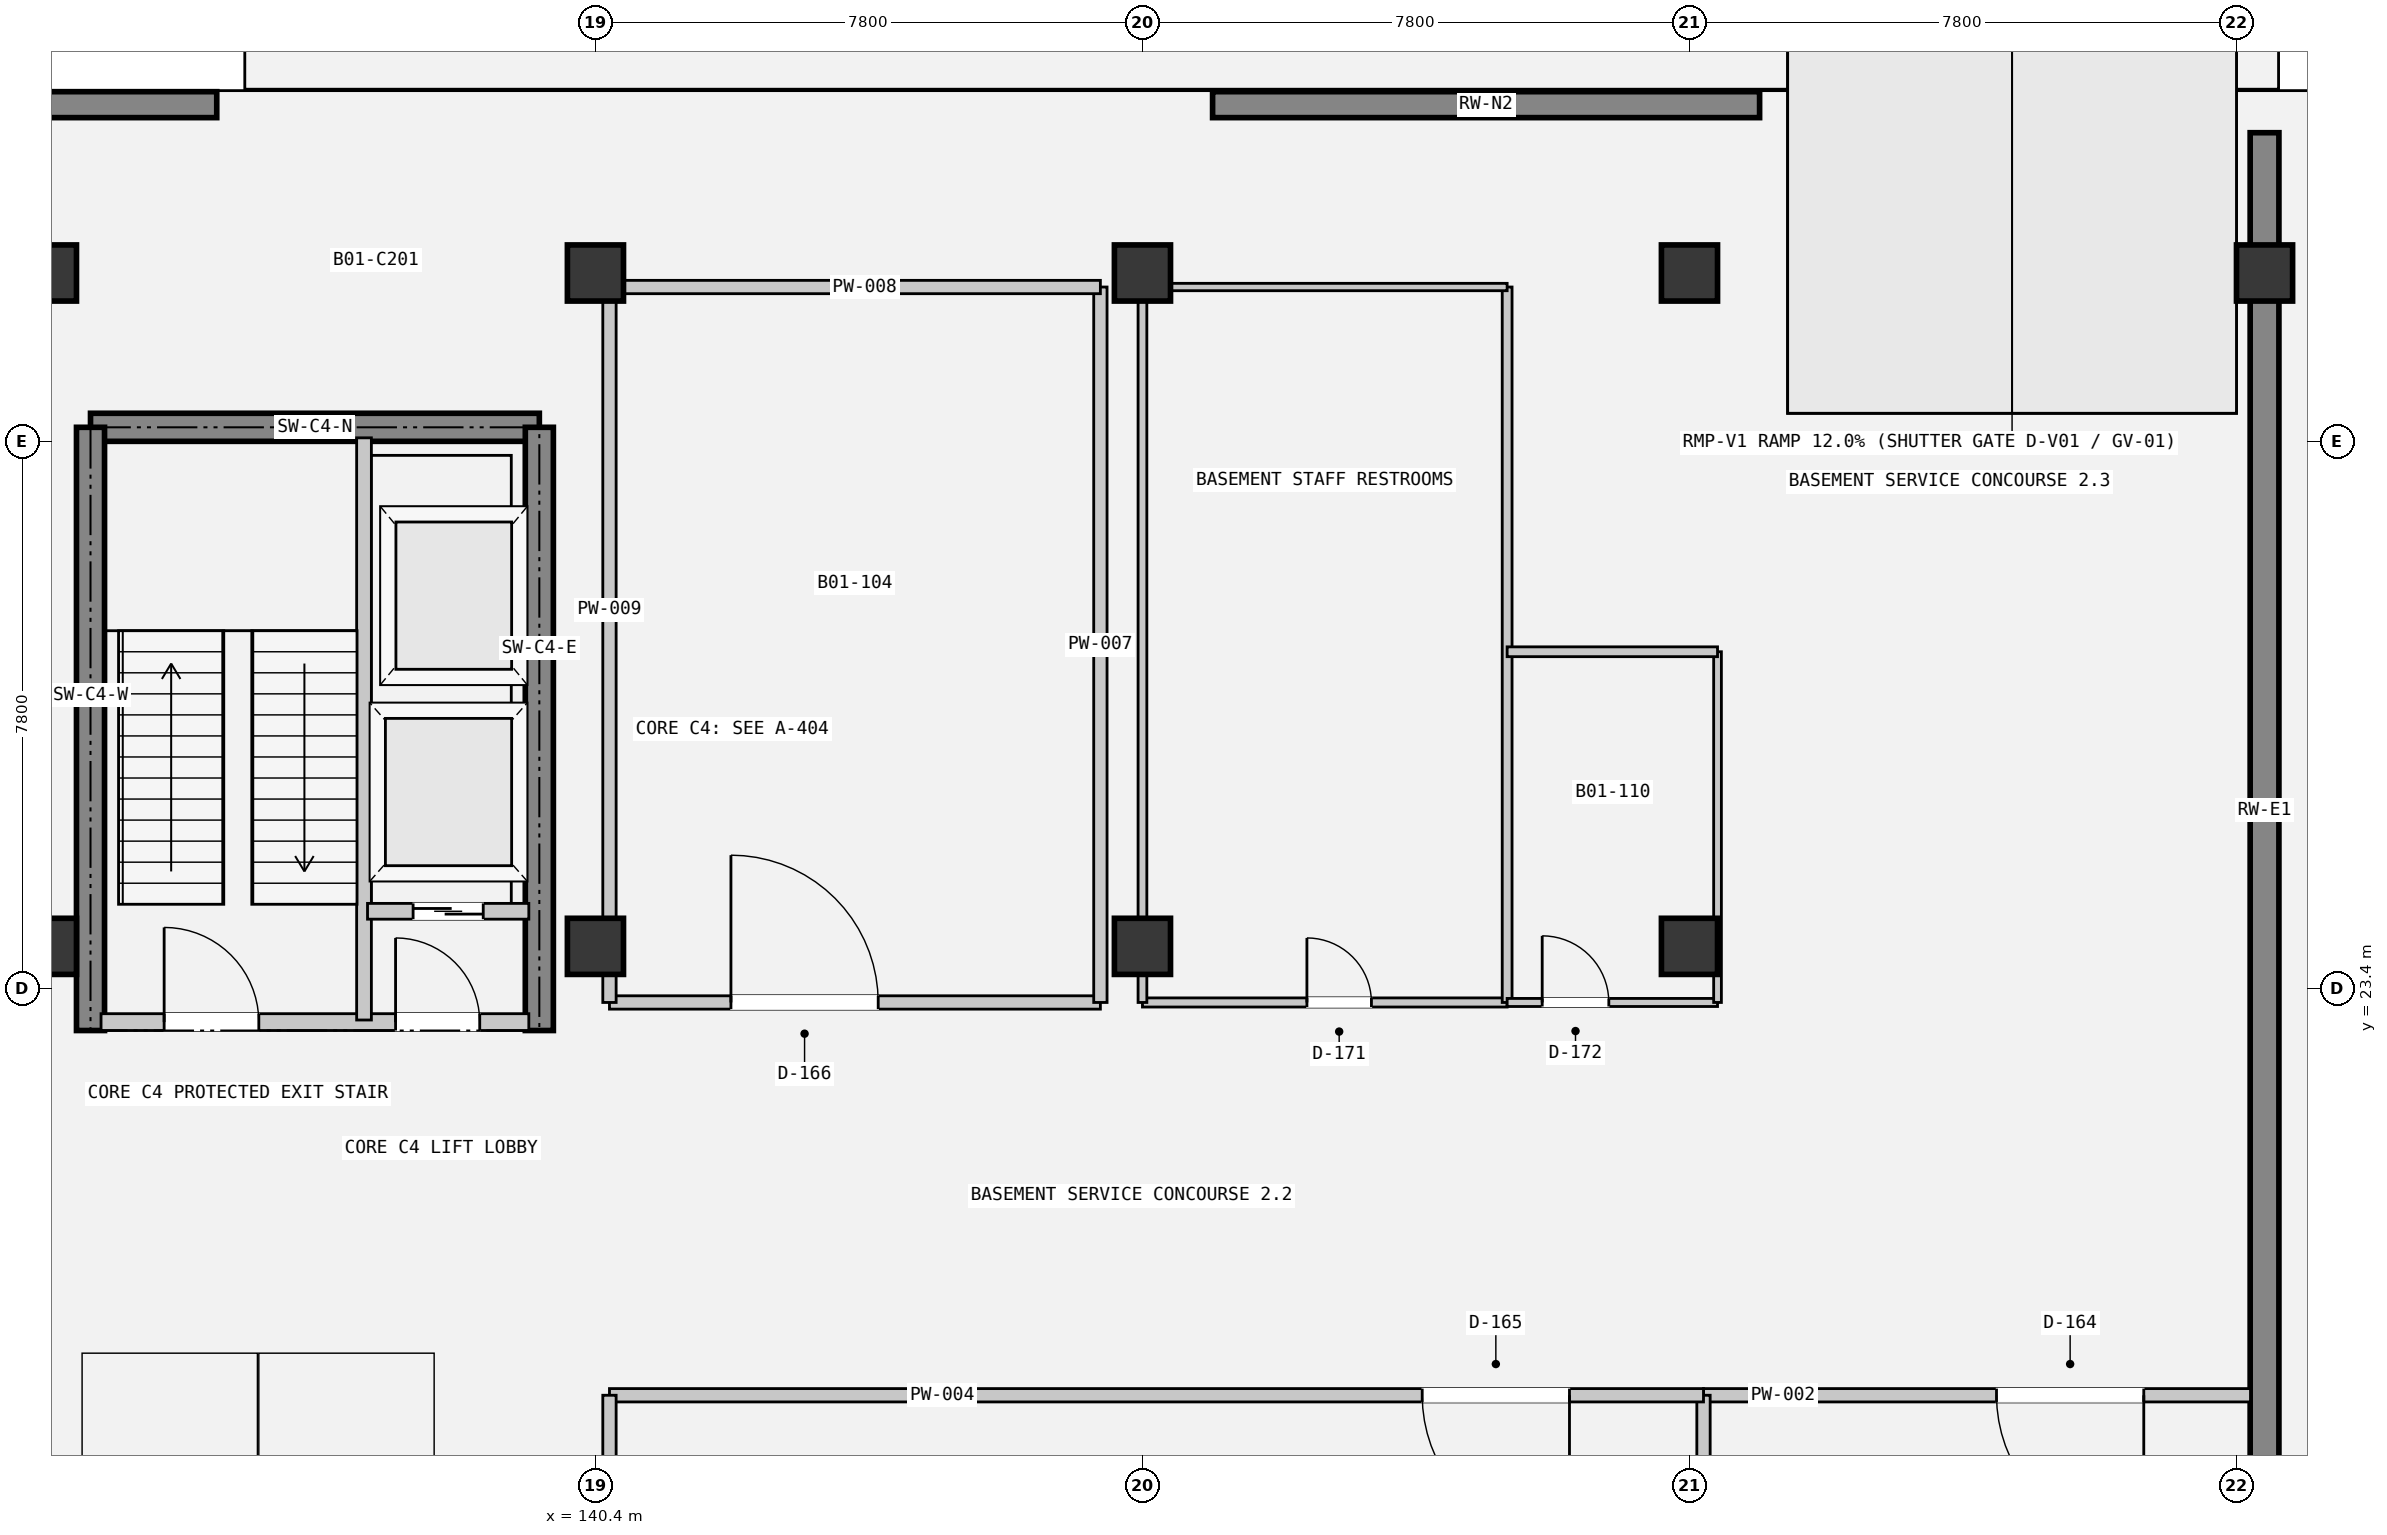
"""IFC4 building model, lengths in metres.
Left out: names, types, materials, properties, quantities, classifications, styles, units other than length and angle.
Written with IfcOpenShell. Run it as: python <this file> out.ifc"""

import sys

from ifc_helpers import new_model, si_unit, direction, frame, frame_2d, origin, origin_2d, place, context, subcontext, project, spatial, rectangle, extrude, element, fill, save


model = new_model("IFC4")
c1 = context("Model", 3, precision=1e-05, world=origin(), true_north=direction((0.0, 1.0)))
c2 = subcontext(c1, "Body", "Model", "MODEL_VIEW")
j1 = project(units=[si_unit("LENGTHUNIT", "METRE"), si_unit("PLANEANGLEUNIT", "RADIAN")], contexts=[c1])
p1 = place(None, origin())
s1 = spatial("IfcSite", under=j1, at=p1, CompositionType="ELEMENT")
p2 = place(p1, origin())
s2 = spatial("IfcBuilding", under=s1, at=p2, CompositionType="ELEMENT")
p3 = place(p2, frame((0.0, 0.0, -4.8)))
s3 = spatial("IfcBuildingStorey", under=s2, at=p3, CompositionType="ELEMENT", Elevation=-4.8)
for number, where, z_axis, x_axis in (
    (1, (132.6, 24.0, 0.0), (0.0, 0.0, 1.0), (1.0, 0.0, 0.0)),
    (2, (132.6, 33.6, 0.0), (0.0, 0.0, 1.0), (1.0, 0.0, 0.0)),
    (3, (140.4, 24.0, 0.0), (0.0, 0.0, 1.0), (1.0, 0.0, 0.0)),
    (4, (140.4, 33.6, 0.0), (0.0, 0.0, 1.0), (1.0, 0.0, 0.0)),
    (5, (148.2, 24.0, 0.0), (0.0, 0.0, 1.0), (1.0, 0.0, 0.0)),
    (6, (148.2, 33.6, 0.0), (0.0, 0.0, 1.0), (1.0, 0.0, 0.0)),
    (7, (156.0, 24.0, 0.0), (0.0, 0.0, 1.0), (1.0, 0.0, 0.0)),
    (8, (156.0, 33.6, 0.0), (0.0, 0.0, 1.0), (1.0, 0.0, 0.0)),
    (9, (164.2, 33.6, 0.0), (0.0, 0.0, 1.0), (1.0, 0.0, 0.0)),
):
    element("IfcColumn", number, at=place(p3, frame(where, z_axis=z_axis, x_axis=x_axis)), inside=s3, PredefinedType="COLUMN", context=c2, shape_type="SweptSolid", body=[
        extrude(rectangle(XDim=0.8, YDim=0.8, at=origin_2d()), origin(), (0.0, 0.0, 1.0), 4.8),
    ])
p4 = place(p3, frame((133.2, 31.4, 0.0), z_axis=(0.0, 0.0, 1.0), x_axis=(1.0, 0.0, 0.0)))
e10 = element("IfcWall", 10, at=p4, inside=s3, PredefinedType="SHEAR", context=c2, shape_type="SweptSolid", body=[
    extrude(rectangle(XDim=6.4, YDim=0.4, at=frame_2d((3.2, 0.0))), origin(), (0.0, 0.0, 1.0), 4.8),
])
for number, where, z_axis, x_axis in (
    (11, (133.2, 22.8, 0.0), (0.0, 0.0, 1.0), (0.0, 1.0, 0.0)),
    (12, (139.6, 22.8, 0.0), (0.0, 0.0, 1.0), (0.0, 1.0, 0.0)),
):
    element("IfcWall", number, at=place(p3, frame(where, z_axis=z_axis, x_axis=x_axis)), inside=s3, PredefinedType="SHEAR", context=c2, shape_type="SweptSolid", body=[
        extrude(rectangle(XDim=8.6, YDim=0.4, at=frame_2d((4.3, 0.0))), origin(), (0.0, 0.0, 1.0), 4.8),
    ])
p5 = place(p3, frame((164.2, 0.4, 0.0), z_axis=(0.0, 0.0, 1.0), x_axis=(0.0, 1.0, 0.0)))
e13 = element("IfcWall", 13, at=p5, inside=s3, PredefinedType="USERDEFINED", context=c2, shape_type="SweptSolid", body=[
    extrude(rectangle(XDim=35.2, YDim=0.41, at=frame_2d((17.6, 0.0))), origin(), (0.0, 0.0, 1.0), 4.52),
])
p6 = place(p3, frame((70.6, 36.0, 0.0), z_axis=(0.0, 0.0, 1.0), x_axis=(1.0, 0.0, 0.0)))
e14 = element("IfcWall", 14, at=p6, inside=s3, PredefinedType="USERDEFINED", context=c2, shape_type="SweptSolid", body=[
    extrude(rectangle(XDim=64.4, YDim=0.37, at=frame_2d((32.2, 0.0))), origin(), (0.0, 0.0, 1.0), 4.52),
])
p7 = place(p3, frame((149.2, 36.0, 0.0), z_axis=(0.0, 0.0, 1.0), x_axis=(1.0, 0.0, 0.0)))
e15 = element("IfcWall", 15, at=p7, inside=s3, PredefinedType="USERDEFINED", context=c2, shape_type="SweptSolid", body=[
    extrude(rectangle(XDim=7.8, YDim=0.37, at=frame_2d((3.9, 0.0))), origin(), (0.0, 0.0, 1.0), 4.52),
])
p8 = place(p3, frame((133.35, 22.92, 0.0), z_axis=(0.0, 0.0, 1.0), x_axis=(1.0, 0.0, 0.0)))
e16 = element("IfcWall", 16, at=p8, inside=s3, PredefinedType="PARTITIONING", context=c2, shape_type="SweptSolid", body=[
    extrude(rectangle(XDim=6.1, YDim=0.24, at=frame_2d((3.05, 0.0))), origin(), (0.0, 0.0, 1.0), 3.84),
])
p9 = place(p8, frame((0.9, 0.0, 0.0)))
e17 = element("IfcOpeningElement", 17, at=p9, cuts=e16, PredefinedType="OPENING", context=c2, shape_type="SweptSolid", body=[
    extrude(rectangle(XDim=1.35, YDim=2.2, at=frame_2d((0.675, 1.1))), frame((0.0, 0.13, 0.0), z_axis=(0.0, -1.0, 0.0), x_axis=(1.0, 0.0, 0.0)), (0.0, 0.0, 1.0), 0.26),
])
p10 = place(p8, frame((4.2, 0.0, 0.0)))
e18 = element("IfcOpeningElement", 18, at=p10, cuts=e16, PredefinedType="OPENING", context=c2, shape_type="SweptSolid", body=[
    extrude(rectangle(XDim=1.2, YDim=2.2, at=frame_2d((0.6, 1.1))), frame((0.0, 0.13, 0.0), z_axis=(0.0, -1.0, 0.0), x_axis=(1.0, 0.0, 0.0)), (0.0, 0.0, 1.0), 0.26),
])
p11 = place(p3, frame((137.1, 22.95, 0.0), z_axis=(0.0, 0.0, 1.0), x_axis=(0.0, 1.0, 0.0)))
e19 = element("IfcWall", 19, at=p11, inside=s3, PredefinedType="PARTITIONING", context=c2, shape_type="SweptSolid", body=[
    extrude(rectangle(XDim=8.3, YDim=0.21, at=frame_2d((4.15, 0.0))), origin(), (0.0, 0.0, 1.0), 3.84),
])
p12 = place(p3, frame((137.15, 24.5, 0.0), z_axis=(0.0, 0.0, 1.0), x_axis=(1.0, 0.0, 0.0)))
e20 = element("IfcWall", 20, at=p12, inside=s3, PredefinedType="PARTITIONING", context=c2, shape_type="SweptSolid", body=[
    extrude(rectangle(XDim=2.3, YDim=0.225, at=frame_2d((1.15, 0.0))), origin(), (0.0, 0.0, 1.0), 3.84),
])
p13 = place(p12, frame((0.65, 0.0, 0.0)))
e21 = element("IfcOpeningElement", 21, at=p13, cuts=e20, PredefinedType="OPENING", context=c2, shape_type="SweptSolid", body=[
    extrude(rectangle(XDim=1.0, YDim=2.15, at=frame_2d((0.5, 1.075))), frame((0.0, 0.123, 0.0), z_axis=(0.0, -1.0, 0.0), x_axis=(1.0, 0.0, 0.0)), (0.0, 0.0, 1.0), 0.245),
])
p14 = place(p3, frame((164.0, 17.6, 0.0), z_axis=(0.0, 0.0, 1.0), x_axis=(-1.0, 0.0, 0.0)))
e22 = element("IfcWall", 22, at=p14, inside=s3, PredefinedType="PARTITIONING", context=c2, shape_type="SweptSolid", body=[
    extrude(rectangle(XDim=7.8, YDim=0.19, at=frame_2d((3.9, 0.0))), origin(), (0.0, 0.0, 1.0), 3.45),
])
p15 = place(p14, frame((1.522, 0.0, 0.0)))
e23 = element("IfcOpeningElement", 23, at=p15, cuts=e22, PredefinedType="OPENING", context=c2, shape_type="SweptSolid", body=[
    extrude(rectangle(XDim=2.1, YDim=2.6, at=frame_2d((1.05, 1.3))), frame((0.0, 0.105, 0.0), z_axis=(0.0, -1.0, 0.0), x_axis=(1.0, 0.0, 0.0)), (0.0, 0.0, 1.0), 0.21),
])
p16 = place(p3, frame((156.2, 17.6, 0.0), z_axis=(0.0, 0.0, 1.0), x_axis=(0.0, -1.0, 0.0)))
e24 = element("IfcWall", 24, at=p16, inside=s3, PredefinedType="PARTITIONING", context=c2, shape_type="SweptSolid", body=[
    extrude(rectangle(XDim=17.2, YDim=0.19, at=frame_2d((8.6, 0.0))), origin(), (0.0, 0.0, 1.0), 3.45),
])
p17 = place(p3, frame((156.2, 17.6, 0.0), z_axis=(0.0, 0.0, 1.0), x_axis=(-1.0, 0.0, 0.0)))
e25 = element("IfcWall", 25, at=p17, inside=s3, PredefinedType="PARTITIONING", context=c2, shape_type="SweptSolid", body=[
    extrude(rectangle(XDim=15.6, YDim=0.19, at=frame_2d((7.8, 0.0))), origin(), (0.0, 0.0, 1.0), 3.45),
])
p18 = place(p17, frame((1.911, 0.0, 0.0)))
e26 = element("IfcOpeningElement", 26, at=p18, cuts=e25, PredefinedType="OPENING", context=c2, shape_type="SweptSolid", body=[
    extrude(rectangle(XDim=2.1, YDim=2.6, at=frame_2d((1.05, 1.3))), frame((0.0, 0.105, 0.0), z_axis=(0.0, -1.0, 0.0), x_axis=(1.0, 0.0, 0.0)), (0.0, 0.0, 1.0), 0.21),
])
p19 = place(p3, frame((140.6, 17.6, 0.0), z_axis=(0.0, 0.0, 1.0), x_axis=(0.0, -1.0, 0.0)))
e27 = element("IfcWall", 27, at=p19, inside=s3, PredefinedType="PARTITIONING", context=c2, shape_type="SweptSolid", body=[
    extrude(rectangle(XDim=17.2, YDim=0.19, at=frame_2d((8.6, 0.0))), origin(), (0.0, 0.0, 1.0), 3.45),
])
p20 = place(p3, frame((140.6, 23.2, 0.0), z_axis=(0.0, 0.0, 1.0), x_axis=(1.0, 0.0, 0.0)))
e28 = element("IfcWall", 28, at=p20, inside=s3, PredefinedType="PARTITIONING", context=c2, shape_type="SweptSolid", body=[
    extrude(rectangle(XDim=7.0, YDim=0.19, at=frame_2d((3.5, 0.0))), origin(), (0.0, 0.0, 1.0), 3.45),
])
p21 = place(p20, frame((1.732, 0.0, 0.0)))
e29 = element("IfcOpeningElement", 29, at=p21, cuts=e28, PredefinedType="OPENING", context=c2, shape_type="SweptSolid", body=[
    extrude(rectangle(XDim=2.1, YDim=2.6, at=frame_2d((1.05, 1.3))), frame((0.0, 0.105, 0.0), z_axis=(0.0, -1.0, 0.0), x_axis=(1.0, 0.0, 0.0)), (0.0, 0.0, 1.0), 0.21),
])
p22 = place(p3, frame((147.6, 23.2, 0.0), z_axis=(0.0, 0.0, 1.0), x_axis=(0.0, 1.0, 0.0)))
e30 = element("IfcWall", 30, at=p22, inside=s3, PredefinedType="PARTITIONING", context=c2, shape_type="SweptSolid", body=[
    extrude(rectangle(XDim=10.2, YDim=0.19, at=frame_2d((5.1, 0.0))), origin(), (0.0, 0.0, 1.0), 3.45),
])
p23 = place(p3, frame((147.6, 33.4, 0.0), z_axis=(0.0, 0.0, 1.0), x_axis=(-1.0, 0.0, 0.0)))
e31 = element("IfcWall", 31, at=p23, inside=s3, PredefinedType="PARTITIONING", context=c2, shape_type="SweptSolid", body=[
    extrude(rectangle(XDim=7.0, YDim=0.19, at=frame_2d((3.5, 0.0))), origin(), (0.0, 0.0, 1.0), 3.45),
])
p24 = place(p3, frame((140.6, 33.4, 0.0), z_axis=(0.0, 0.0, 1.0), x_axis=(0.0, -1.0, 0.0)))
e32 = element("IfcWall", 32, at=p24, inside=s3, PredefinedType="PARTITIONING", context=c2, shape_type="SweptSolid", body=[
    extrude(rectangle(XDim=10.2, YDim=0.19, at=frame_2d((5.1, 0.0))), origin(), (0.0, 0.0, 1.0), 3.45),
])
p25 = place(p3, frame((148.2, 23.2, 0.0), z_axis=(0.0, 0.0, 1.0), x_axis=(1.0, 0.0, 0.0)))
e33 = element("IfcWall", 33, at=p25, inside=s3, PredefinedType="PARTITIONING", context=c2, shape_type="SweptSolid", body=[
    extrude(rectangle(XDim=5.2, YDim=0.13, at=frame_2d((2.6, 0.0))), origin(), (0.0, 0.0, 1.0), 3.45),
])
p26 = place(p25, frame((2.345, 0.0, 0.0)))
e34 = element("IfcOpeningElement", 34, at=p26, cuts=e33, PredefinedType="OPENING", context=c2, shape_type="SweptSolid", body=[
    extrude(rectangle(XDim=0.92, YDim=2.1, at=frame_2d((0.46, 1.05))), frame((0.0, 0.075, 0.0), z_axis=(0.0, -1.0, 0.0), x_axis=(1.0, 0.0, 0.0)), (0.0, 0.0, 1.0), 0.15),
])
p27 = place(p3, frame((153.4, 23.2, 0.0), z_axis=(0.0, 0.0, 1.0), x_axis=(0.0, 1.0, 0.0)))
e35 = element("IfcWall", 35, at=p27, inside=s3, PredefinedType="PARTITIONING", context=c2, shape_type="SweptSolid", body=[
    extrude(rectangle(XDim=10.2, YDim=0.14, at=frame_2d((5.1, 0.0))), origin(), (0.0, 0.0, 1.0), 3.45),
])
p28 = place(p3, frame((153.4, 33.4, 0.0), z_axis=(0.0, 0.0, 1.0), x_axis=(-1.0, 0.0, 0.0)))
e36 = element("IfcWall", 36, at=p28, inside=s3, PredefinedType="PARTITIONING", context=c2, shape_type="SweptSolid", body=[
    extrude(rectangle(XDim=5.2, YDim=0.105, at=frame_2d((2.6, 0.0))), origin(), (0.0, 0.0, 1.0), 3.45),
])
p29 = place(p3, frame((148.2, 33.4, 0.0), z_axis=(0.0, 0.0, 1.0), x_axis=(0.0, -1.0, 0.0)))
e37 = element("IfcWall", 37, at=p29, inside=s3, PredefinedType="PARTITIONING", context=c2, shape_type="SweptSolid", body=[
    extrude(rectangle(XDim=10.2, YDim=0.125, at=frame_2d((5.1, 0.0))), origin(), (0.0, 0.0, 1.0), 3.45),
])
p30 = place(p3, frame((153.4, 23.2, 0.0), z_axis=(0.0, 0.0, 1.0), x_axis=(1.0, 0.0, 0.0)))
e38 = element("IfcWall", 38, at=p30, inside=s3, PredefinedType="PARTITIONING", context=c2, shape_type="SweptSolid", body=[
    extrude(rectangle(XDim=3.0, YDim=0.115, at=frame_2d((1.5, 0.0))), origin(), (0.0, 0.0, 1.0), 3.45),
])
p31 = place(p30, frame((0.5, 0.0, 0.0)))
e39 = element("IfcOpeningElement", 39, at=p31, cuts=e38, PredefinedType="OPENING", context=c2, shape_type="SweptSolid", body=[
    extrude(rectangle(XDim=0.95, YDim=2.1, at=frame_2d((0.475, 1.05))), frame((0.0, 0.067, 0.0), z_axis=(0.0, -1.0, 0.0), x_axis=(1.0, 0.0, 0.0)), (0.0, 0.0, 1.0), 0.135),
])
p32 = place(p3, frame((156.4, 23.2, 0.0), z_axis=(0.0, 0.0, 1.0), x_axis=(0.0, 1.0, 0.0)))
e40 = element("IfcWall", 40, at=p32, inside=s3, PredefinedType="PARTITIONING", context=c2, shape_type="SweptSolid", body=[
    extrude(rectangle(XDim=5.0, YDim=0.11, at=frame_2d((2.5, 0.0))), origin(), (0.0, 0.0, 1.0), 3.45),
])
p33 = place(p3, frame((156.4, 28.2, 0.0), z_axis=(0.0, 0.0, 1.0), x_axis=(-1.0, 0.0, 0.0)))
e41 = element("IfcWall", 41, at=p33, inside=s3, PredefinedType="PARTITIONING", context=c2, shape_type="SweptSolid", body=[
    extrude(rectangle(XDim=3.0, YDim=0.14, at=frame_2d((1.5, 0.0))), origin(), (0.0, 0.0, 1.0), 3.45),
])
p34 = place(p9, origin())
e42 = element("IfcDoor", 42, at=p34, inside=s3, OperationType="SINGLE_SWING_LEFT", PredefinedType="DOOR", context=c2, shape_type="SweptSolid", body=[
    extrude(rectangle(XDim=1.35, YDim=2.2, at=frame_2d((0.675, 1.1))), frame((0.0, 0.025, 0.0), z_axis=(0.0, -1.0, 0.0), x_axis=(1.0, 0.0, 0.0)), (0.0, 0.0, 1.0), 0.05),
])
fill(e17, e42)
p35 = place(p10, origin())
e43 = element("IfcDoor", 43, at=p35, inside=s3, OperationType="SINGLE_SWING_RIGHT", PredefinedType="DOOR", context=c2, shape_type="SweptSolid", body=[
    extrude(rectangle(XDim=1.2, YDim=2.2, at=frame_2d((0.6, 1.1))), frame((0.0, 0.025, 0.0), z_axis=(0.0, -1.0, 0.0), x_axis=(1.0, 0.0, 0.0)), (0.0, 0.0, 1.0), 0.05),
])
fill(e18, e43)
p36 = place(p13, origin())
e44 = element("IfcDoor", 44, at=p36, inside=s3, OperationType="SLIDING_TO_LEFT", PredefinedType="DOOR", context=c2, shape_type="SweptSolid", body=[
    extrude(rectangle(XDim=1.0, YDim=2.15, at=frame_2d((0.5, 1.075))), frame((0.0, 0.025, 0.0), z_axis=(0.0, -1.0, 0.0), x_axis=(1.0, 0.0, 0.0)), (0.0, 0.0, 1.0), 0.05),
])
fill(e21, e44)
p37 = place(p15, origin())
e45 = element("IfcDoor", 45, at=p37, inside=s3, OperationType="DOUBLE_DOOR_SINGLE_SWING", PredefinedType="DOOR", context=c2, shape_type="SweptSolid", body=[
    extrude(rectangle(XDim=2.1, YDim=2.6, at=frame_2d((1.05, 1.3))), frame((0.0, 0.025, 0.0), z_axis=(0.0, -1.0, 0.0), x_axis=(1.0, 0.0, 0.0)), (0.0, 0.0, 1.0), 0.05),
])
fill(e23, e45)
p38 = place(p18, origin())
e46 = element("IfcDoor", 46, at=p38, inside=s3, OperationType="DOUBLE_DOOR_SINGLE_SWING", PredefinedType="DOOR", context=c2, shape_type="SweptSolid", body=[
    extrude(rectangle(XDim=2.1, YDim=2.6, at=frame_2d((1.05, 1.3))), frame((0.0, 0.025, 0.0), z_axis=(0.0, -1.0, 0.0), x_axis=(1.0, 0.0, 0.0)), (0.0, 0.0, 1.0), 0.05),
])
fill(e26, e46)
p39 = place(p21, origin())
e47 = element("IfcDoor", 47, at=p39, inside=s3, OperationType="DOUBLE_DOOR_SINGLE_SWING", PredefinedType="DOOR", context=c2, shape_type="SweptSolid", body=[
    extrude(rectangle(XDim=2.1, YDim=2.6, at=frame_2d((1.05, 1.3))), frame((0.0, 0.025, 0.0), z_axis=(0.0, -1.0, 0.0), x_axis=(1.0, 0.0, 0.0)), (0.0, 0.0, 1.0), 0.05),
])
fill(e29, e47)
p40 = place(p26, origin())
e48 = element("IfcDoor", 48, at=p40, inside=s3, OperationType="SINGLE_SWING_RIGHT", PredefinedType="DOOR", context=c2, shape_type="SweptSolid", body=[
    extrude(rectangle(XDim=0.92, YDim=2.1, at=frame_2d((0.46, 1.05))), frame((0.0, 0.025, 0.0), z_axis=(0.0, -1.0, 0.0), x_axis=(1.0, 0.0, 0.0)), (0.0, 0.0, 1.0), 0.05),
])
fill(e34, e48)
p41 = place(p31, origin())
e49 = element("IfcDoor", 49, at=p41, inside=s3, OperationType="SINGLE_SWING_LEFT", PredefinedType="DOOR", context=c2, shape_type="SweptSolid", body=[
    extrude(rectangle(XDim=0.95, YDim=2.1, at=frame_2d((0.475, 1.05))), frame((0.0, 0.025, 0.0), z_axis=(0.0, -1.0, 0.0), x_axis=(1.0, 0.0, 0.0)), (0.0, 0.0, 1.0), 0.05),
])
fill(e39, e49)
save(model, sys.argv[1])
